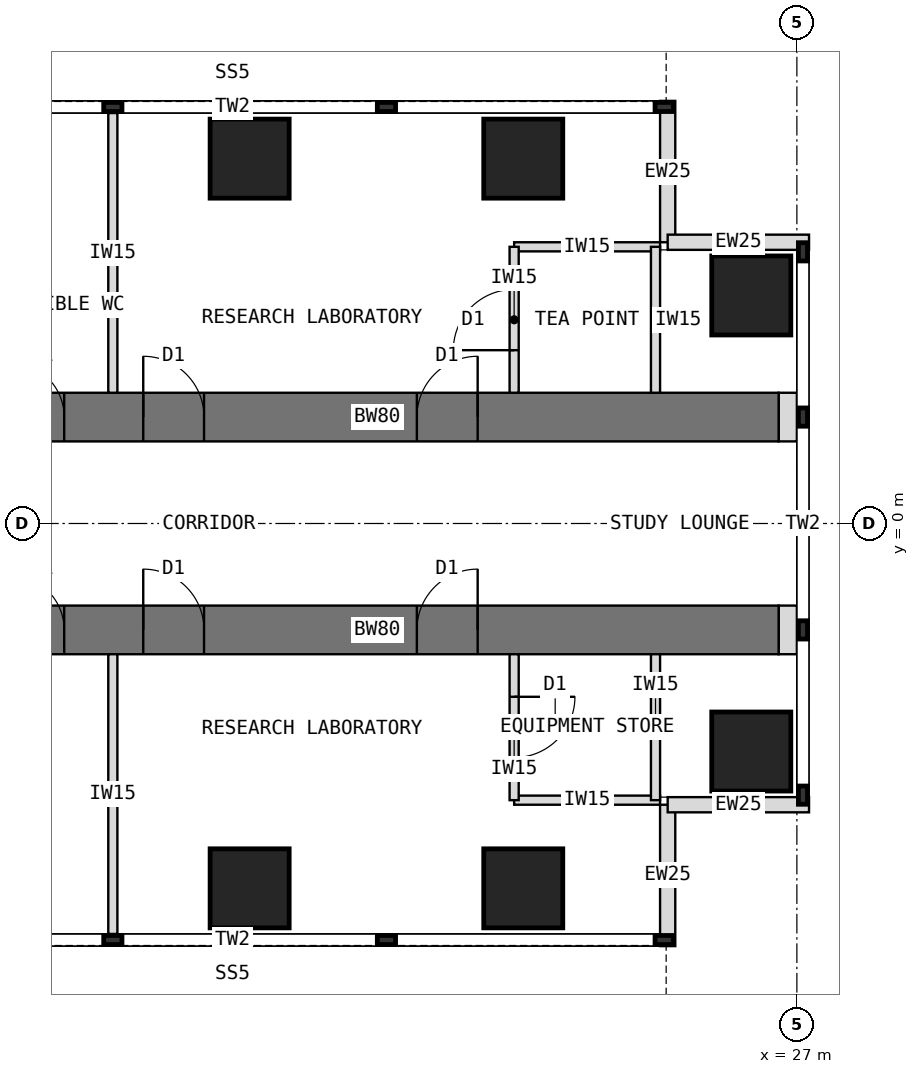
"""IFC4 building model, lengths in metres.
Left out: names, types, materials, properties, quantities, classifications, styles, units other than length and angle.
Written with IfcOpenShell. Run it as: python <this file> out.ifc"""

import sys

from ifc_helpers import new_model, si_unit, direction, frame, frame_2d, origin, origin_2d, place, context, subcontext, project, spatial, rectangle, extrude, element, fill, save


model = new_model("IFC4")
c1 = context("Model", 3, precision=1e-05, world=origin(), true_north=direction((0.0, 1.0)))
c2 = subcontext(c1, "Body", "Model", "MODEL_VIEW")
j1 = project(units=[si_unit("LENGTHUNIT", "METRE"), si_unit("PLANEANGLEUNIT", "RADIAN")], contexts=[c1])
p1 = place(None, origin())
s1 = spatial("IfcSite", under=j1, at=p1, CompositionType="ELEMENT")
p2 = place(p1, origin())
s2 = spatial("IfcBuilding", under=s1, at=p2, CompositionType="ELEMENT")
p3 = place(p2, frame((0.0, 0.0, 121.5)))
s3 = spatial("IfcBuildingStorey", under=s2, at=p3, CompositionType="ELEMENT", Elevation=121.5)
p4 = place(p3, frame((13.5, 1.75, 0.0), z_axis=(0.0, 0.0, 1.0), x_axis=(1.0, 0.0, 0.0)))
e1 = element("IfcWall", 1, at=p4, inside=s3, PredefinedType="SHEAR", context=c2, shape_type="SweptSolid", body=[
    extrude(rectangle(XDim=13.2, YDim=0.8, at=frame_2d((6.6, 0.0))), origin(), (0.0, 0.0, 1.0), 4.0),
])
p5 = place(p4, frame((0.55, 0.0, 0.0)))
e2 = element("IfcOpeningElement", 2, at=p5, cuts=e1, PredefinedType="OPENING", context=c2, shape_type="SweptSolid", body=[
    extrude(rectangle(XDim=0.9, YDim=2.1, at=frame_2d((0.45, 1.05))), frame((0.0, 0.41, 0.0), z_axis=(0.0, -1.0, 0.0), x_axis=(1.0, 0.0, 0.0)), (0.0, 0.0, 1.0), 0.82),
])
p6 = place(p4, frame((2.75, 0.0, 0.0)))
e3 = element("IfcOpeningElement", 3, at=p6, cuts=e1, PredefinedType="OPENING", context=c2, shape_type="SweptSolid", body=[
    extrude(rectangle(XDim=1.0, YDim=2.1, at=frame_2d((0.5, 1.05))), frame((0.0, 0.41, 0.0), z_axis=(0.0, -1.0, 0.0), x_axis=(1.0, 0.0, 0.0)), (0.0, 0.0, 1.0), 0.82),
])
p7 = place(p4, frame((7.25, 0.0, 0.0)))
e4 = element("IfcOpeningElement", 4, at=p7, cuts=e1, PredefinedType="OPENING", context=c2, shape_type="SweptSolid", body=[
    extrude(rectangle(XDim=1.0, YDim=2.1, at=frame_2d((0.5, 1.05))), frame((0.0, 0.41, 0.0), z_axis=(0.0, -1.0, 0.0), x_axis=(1.0, 0.0, 0.0)), (0.0, 0.0, 1.0), 0.82),
])
p8 = place(p3, frame((13.5, -1.75, 0.0), z_axis=(0.0, 0.0, 1.0), x_axis=(1.0, 0.0, 0.0)))
e5 = element("IfcWall", 5, at=p8, inside=s3, PredefinedType="SHEAR", context=c2, shape_type="SweptSolid", body=[
    extrude(rectangle(XDim=13.2, YDim=0.8, at=frame_2d((6.6, 0.0))), origin(), (0.0, 0.0, 1.0), 4.0),
])
p9 = place(p8, frame((0.55, 0.0, 0.0)))
e6 = element("IfcOpeningElement", 6, at=p9, cuts=e5, PredefinedType="OPENING", context=c2, shape_type="SweptSolid", body=[
    extrude(rectangle(XDim=0.9, YDim=2.1, at=frame_2d((0.45, 1.05))), frame((0.0, 0.41, 0.0), z_axis=(0.0, -1.0, 0.0), x_axis=(1.0, 0.0, 0.0)), (0.0, 0.0, 1.0), 0.82),
])
p10 = place(p8, frame((2.75, 0.0, 0.0)))
e7 = element("IfcOpeningElement", 7, at=p10, cuts=e5, PredefinedType="OPENING", context=c2, shape_type="SweptSolid", body=[
    extrude(rectangle(XDim=1.0, YDim=2.1, at=frame_2d((0.5, 1.05))), frame((0.0, 0.41, 0.0), z_axis=(0.0, -1.0, 0.0), x_axis=(1.0, 0.0, 0.0)), (0.0, 0.0, 1.0), 0.82),
])
p11 = place(p8, frame((7.25, 0.0, 0.0)))
e8 = element("IfcOpeningElement", 8, at=p11, cuts=e5, PredefinedType="OPENING", context=c2, shape_type="SweptSolid", body=[
    extrude(rectangle(XDim=1.0, YDim=2.1, at=frame_2d((0.5, 1.05))), frame((0.0, 0.41, 0.0), z_axis=(0.0, -1.0, 0.0), x_axis=(1.0, 0.0, 0.0)), (0.0, 0.0, 1.0), 0.82),
])
for number, where, z_axis, x_axis in (
    (9, (18.0, 6.0, 0.0), (0.0, 0.0, 1.0), (1.0, 0.0, 0.0)),
    (10, (18.0, -6.0, 0.0), (0.0, 0.0, 1.0), (1.0, 0.0, 0.0)),
    (11, (22.5, 6.0, 0.0), (0.0, 0.0, 1.0), (1.0, 0.0, 0.0)),
    (12, (22.5, -6.0, 0.0), (0.0, 0.0, 1.0), (1.0, 0.0, 0.0)),
    (13, (26.25, 3.75, 0.0), (0.0, 0.0, 1.0), (1.0, 0.0, 0.0)),
    (14, (26.25, -3.75, 0.0), (0.0, 0.0, 1.0), (1.0, 0.0, 0.0)),
):
    element("IfcColumn", number, at=place(p3, frame(where, z_axis=z_axis, x_axis=x_axis)), inside=s3, PredefinedType="COLUMN", context=c2, shape_type="SweptSolid", body=[
        extrude(rectangle(XDim=1.3, YDim=1.3, at=origin_2d()), origin(), (0.0, 0.0, 1.0), 4.0),
    ])
for number, where, z_axis, x_axis in (
    (15, (24.875, 6.95, 0.0), (0.0, 0.0, 1.0), (0.0, -1.0, 0.0)),
    (16, (24.875, 4.625, 0.0), (0.0, 0.0, 1.0), (1.0, 0.0, 0.0)),
    (17, (24.875, -6.95, 0.0), (0.0, 0.0, 1.0), (0.0, 1.0, 0.0)),
    (18, (24.875, -4.625, 0.0), (0.0, 0.0, 1.0), (1.0, 0.0, 0.0)),
):
    element("IfcWall", number, at=place(p3, frame(where, z_axis=z_axis, x_axis=x_axis)), inside=s3, PredefinedType="STANDARD", context=c2, shape_type="SweptSolid", body=[
        extrude(rectangle(XDim=2.325, YDim=0.25, at=frame_2d((1.163, 0.0))), origin(), (0.0, 0.0, 1.0), 3.8),
    ])
for number, where, z_axis, x_axis in (
    (19, (26.7, 1.75, 0.0), (0.0, 0.0, 1.0), (1.0, 0.0, 0.0)),
    (20, (26.7, -1.75, 0.0), (0.0, 0.0, 1.0), (1.0, 0.0, 0.0)),
):
    element("IfcWall", number, at=place(p3, frame(where, z_axis=z_axis, x_axis=x_axis)), inside=s3, PredefinedType="PARTITIONING", context=c2, shape_type="SweptSolid", body=[
        extrude(rectangle(XDim=0.3, YDim=0.8, at=frame_2d((0.15, 0.0))), origin(), (0.0, 0.0, 1.0), 3.8),
    ])
p12 = place(p3, frame((15.75, 2.15, 0.0), z_axis=(0.0, 0.0, 1.0), x_axis=(0.0, 1.0, 0.0)))
e21 = element("IfcWall", 21, at=p12, inside=s3, PredefinedType="PARTITIONING", context=c2, shape_type="SweptSolid", body=[
    extrude(rectangle(XDim=4.6, YDim=0.15, at=frame_2d((2.3, 0.0))), origin(), (0.0, 0.0, 1.0), 3.8),
])
p13 = place(p3, frame((22.35, 4.55, 0.0), z_axis=(0.0, 0.0, 1.0), x_axis=(1.0, 0.0, 0.0)))
e22 = element("IfcWall", 22, at=p13, inside=s3, PredefinedType="PARTITIONING", context=c2, shape_type="SweptSolid", body=[
    extrude(rectangle(XDim=2.4, YDim=0.15, at=frame_2d((1.2, 0.0))), origin(), (0.0, 0.0, 1.0), 3.8),
])
p14 = place(p3, frame((22.35, 2.15, 0.0), z_axis=(0.0, 0.0, 1.0), x_axis=(0.0, 1.0, 0.0)))
e23 = element("IfcWall", 23, at=p14, inside=s3, PredefinedType="PARTITIONING", context=c2, shape_type="SweptSolid", body=[
    extrude(rectangle(XDim=2.4, YDim=0.15, at=frame_2d((1.2, 0.0))), origin(), (0.0, 0.0, 1.0), 3.8),
])
p15 = place(p14, frame((0.7, 0.0, 0.0)))
e24 = element("IfcOpeningElement", 24, at=p15, cuts=e23, PredefinedType="OPENING", context=c2, shape_type="SweptSolid", body=[
    extrude(rectangle(XDim=1.0, YDim=2.1, at=frame_2d((0.5, 1.05))), frame((0.0, 0.085, 0.0), z_axis=(0.0, -1.0, 0.0), x_axis=(1.0, 0.0, 0.0)), (0.0, 0.0, 1.0), 0.17),
])
p16 = place(p3, frame((24.675, 2.15, 0.0), z_axis=(0.0, 0.0, 1.0), x_axis=(0.0, 1.0, 0.0)))
e25 = element("IfcWall", 25, at=p16, inside=s3, PredefinedType="PARTITIONING", context=c2, shape_type="SweptSolid", body=[
    extrude(rectangle(XDim=2.4, YDim=0.15, at=frame_2d((1.2, 0.0))), origin(), (0.0, 0.0, 1.0), 3.8),
])
p17 = place(p3, frame((15.75, -2.15, 0.0), z_axis=(0.0, 0.0, 1.0), x_axis=(0.0, -1.0, 0.0)))
e26 = element("IfcWall", 26, at=p17, inside=s3, PredefinedType="PARTITIONING", context=c2, shape_type="SweptSolid", body=[
    extrude(rectangle(XDim=4.6, YDim=0.15, at=frame_2d((2.3, 0.0))), origin(), (0.0, 0.0, 1.0), 3.8),
])
p18 = place(p3, frame((22.35, -4.55, 0.0), z_axis=(0.0, 0.0, 1.0), x_axis=(1.0, 0.0, 0.0)))
e27 = element("IfcWall", 27, at=p18, inside=s3, PredefinedType="PARTITIONING", context=c2, shape_type="SweptSolid", body=[
    extrude(rectangle(XDim=2.4, YDim=0.15, at=frame_2d((1.2, 0.0))), origin(), (0.0, 0.0, 1.0), 3.8),
])
p19 = place(p3, frame((22.35, -2.15, 0.0), z_axis=(0.0, 0.0, 1.0), x_axis=(0.0, -1.0, 0.0)))
e28 = element("IfcWall", 28, at=p19, inside=s3, PredefinedType="PARTITIONING", context=c2, shape_type="SweptSolid", body=[
    extrude(rectangle(XDim=2.4, YDim=0.15, at=frame_2d((1.2, 0.0))), origin(), (0.0, 0.0, 1.0), 3.8),
])
p20 = place(p19, frame((0.7, 0.0, 0.0)))
e29 = element("IfcOpeningElement", 29, at=p20, cuts=e28, PredefinedType="OPENING", context=c2, shape_type="SweptSolid", body=[
    extrude(rectangle(XDim=1.0, YDim=2.1, at=frame_2d((0.5, 1.05))), frame((0.0, 0.085, 0.0), z_axis=(0.0, -1.0, 0.0), x_axis=(1.0, 0.0, 0.0)), (0.0, 0.0, 1.0), 0.17),
])
p21 = place(p3, frame((24.675, -2.15, 0.0), z_axis=(0.0, 0.0, 1.0), x_axis=(0.0, -1.0, 0.0)))
e30 = element("IfcWall", 30, at=p21, inside=s3, PredefinedType="PARTITIONING", context=c2, shape_type="SweptSolid", body=[
    extrude(rectangle(XDim=2.4, YDim=0.15, at=frame_2d((1.2, 0.0))), origin(), (0.0, 0.0, 1.0), 3.8),
])
p22 = place(p15, origin())
e31 = element("IfcDoor", 31, at=p22, inside=s3, OperationType="SINGLE_SWING_LEFT", PredefinedType="DOOR", context=c2, shape_type="SweptSolid", body=[
    extrude(rectangle(XDim=1.0, YDim=2.1, at=frame_2d((0.5, 1.05))), frame((0.0, 0.025, 0.0), z_axis=(0.0, -1.0, 0.0), x_axis=(1.0, 0.0, 0.0)), (0.0, 0.0, 1.0), 0.05),
])
fill(e24, e31)
p23 = place(p20, origin())
e32 = element("IfcDoor", 32, at=p23, inside=s3, OperationType="SINGLE_SWING_LEFT", PredefinedType="DOOR", context=c2, shape_type="SweptSolid", body=[
    extrude(rectangle(XDim=1.0, YDim=2.1, at=frame_2d((0.5, 1.05))), frame((0.0, 0.025, 0.0), z_axis=(0.0, -1.0, 0.0), x_axis=(1.0, 0.0, 0.0)), (0.0, 0.0, 1.0), 0.05),
])
fill(e29, e32)
p24 = place(p5, origin())
e33 = element("IfcDoor", 33, at=p24, inside=s3, OperationType="SINGLE_SWING_LEFT", PredefinedType="DOOR", context=c2, shape_type="SweptSolid", body=[
    extrude(rectangle(XDim=0.82, YDim=2.06, at=frame_2d((0.45, 1.03))), frame((0.0, 0.025, 0.0), z_axis=(0.0, -1.0, 0.0), x_axis=(1.0, 0.0, 0.0)), (0.0, 0.0, 1.0), 0.05),
    extrude(rectangle(XDim=0.04, YDim=2.1, at=frame_2d((0.02, 1.05))), frame((0.0, 0.4, 0.0), z_axis=(0.0, -1.0, 0.0), x_axis=(1.0, 0.0, 0.0)), (0.0, 0.0, 1.0), 0.8),
    extrude(rectangle(XDim=0.04, YDim=2.1, at=frame_2d((0.88, 1.05))), frame((0.0, 0.4, 0.0), z_axis=(0.0, -1.0, 0.0), x_axis=(1.0, 0.0, 0.0)), (0.0, 0.0, 1.0), 0.8),
    extrude(rectangle(XDim=0.82, YDim=0.04, at=frame_2d((0.45, 2.08))), frame((0.0, 0.4, 0.0), z_axis=(0.0, -1.0, 0.0), x_axis=(1.0, 0.0, 0.0)), (0.0, 0.0, 1.0), 0.8),
])
fill(e2, e33)
p25 = place(p6, origin())
e34 = element("IfcDoor", 34, at=p25, inside=s3, OperationType="SINGLE_SWING_LEFT", PredefinedType="DOOR", context=c2, shape_type="SweptSolid", body=[
    extrude(rectangle(XDim=0.92, YDim=2.06, at=frame_2d((0.5, 1.03))), frame((0.0, 0.025, 0.0), z_axis=(0.0, -1.0, 0.0), x_axis=(1.0, 0.0, 0.0)), (0.0, 0.0, 1.0), 0.05),
    extrude(rectangle(XDim=0.04, YDim=2.1, at=frame_2d((0.02, 1.05))), frame((0.0, 0.4, 0.0), z_axis=(0.0, -1.0, 0.0), x_axis=(1.0, 0.0, 0.0)), (0.0, 0.0, 1.0), 0.8),
    extrude(rectangle(XDim=0.04, YDim=2.1, at=frame_2d((0.98, 1.05))), frame((0.0, 0.4, 0.0), z_axis=(0.0, -1.0, 0.0), x_axis=(1.0, 0.0, 0.0)), (0.0, 0.0, 1.0), 0.8),
    extrude(rectangle(XDim=0.92, YDim=0.04, at=frame_2d((0.5, 2.08))), frame((0.0, 0.4, 0.0), z_axis=(0.0, -1.0, 0.0), x_axis=(1.0, 0.0, 0.0)), (0.0, 0.0, 1.0), 0.8),
])
fill(e3, e34)
p26 = place(p7, origin())
e35 = element("IfcDoor", 35, at=p26, inside=s3, OperationType="SINGLE_SWING_RIGHT", PredefinedType="DOOR", context=c2, shape_type="SweptSolid", body=[
    extrude(rectangle(XDim=0.92, YDim=2.06, at=frame_2d((0.5, 1.03))), frame((0.0, 0.025, 0.0), z_axis=(0.0, -1.0, 0.0), x_axis=(1.0, 0.0, 0.0)), (0.0, 0.0, 1.0), 0.05),
    extrude(rectangle(XDim=0.04, YDim=2.1, at=frame_2d((0.02, 1.05))), frame((0.0, 0.4, 0.0), z_axis=(0.0, -1.0, 0.0), x_axis=(1.0, 0.0, 0.0)), (0.0, 0.0, 1.0), 0.8),
    extrude(rectangle(XDim=0.04, YDim=2.1, at=frame_2d((0.98, 1.05))), frame((0.0, 0.4, 0.0), z_axis=(0.0, -1.0, 0.0), x_axis=(1.0, 0.0, 0.0)), (0.0, 0.0, 1.0), 0.8),
    extrude(rectangle(XDim=0.92, YDim=0.04, at=frame_2d((0.5, 2.08))), frame((0.0, 0.4, 0.0), z_axis=(0.0, -1.0, 0.0), x_axis=(1.0, 0.0, 0.0)), (0.0, 0.0, 1.0), 0.8),
])
fill(e4, e35)
p27 = place(p9, origin())
e36 = element("IfcDoor", 36, at=p27, inside=s3, OperationType="SINGLE_SWING_LEFT", PredefinedType="DOOR", context=c2, shape_type="SweptSolid", body=[
    extrude(rectangle(XDim=0.82, YDim=2.06, at=frame_2d((0.45, 1.03))), frame((0.0, 0.025, 0.0), z_axis=(0.0, -1.0, 0.0), x_axis=(1.0, 0.0, 0.0)), (0.0, 0.0, 1.0), 0.05),
    extrude(rectangle(XDim=0.04, YDim=2.1, at=frame_2d((0.02, 1.05))), frame((0.0, 0.4, 0.0), z_axis=(0.0, -1.0, 0.0), x_axis=(1.0, 0.0, 0.0)), (0.0, 0.0, 1.0), 0.8),
    extrude(rectangle(XDim=0.04, YDim=2.1, at=frame_2d((0.88, 1.05))), frame((0.0, 0.4, 0.0), z_axis=(0.0, -1.0, 0.0), x_axis=(1.0, 0.0, 0.0)), (0.0, 0.0, 1.0), 0.8),
    extrude(rectangle(XDim=0.82, YDim=0.04, at=frame_2d((0.45, 2.08))), frame((0.0, 0.4, 0.0), z_axis=(0.0, -1.0, 0.0), x_axis=(1.0, 0.0, 0.0)), (0.0, 0.0, 1.0), 0.8),
])
fill(e6, e36)
p28 = place(p10, origin())
e37 = element("IfcDoor", 37, at=p28, inside=s3, OperationType="SINGLE_SWING_LEFT", PredefinedType="DOOR", context=c2, shape_type="SweptSolid", body=[
    extrude(rectangle(XDim=0.92, YDim=2.06, at=frame_2d((0.5, 1.03))), frame((0.0, 0.025, 0.0), z_axis=(0.0, -1.0, 0.0), x_axis=(1.0, 0.0, 0.0)), (0.0, 0.0, 1.0), 0.05),
    extrude(rectangle(XDim=0.04, YDim=2.1, at=frame_2d((0.02, 1.05))), frame((0.0, 0.4, 0.0), z_axis=(0.0, -1.0, 0.0), x_axis=(1.0, 0.0, 0.0)), (0.0, 0.0, 1.0), 0.8),
    extrude(rectangle(XDim=0.04, YDim=2.1, at=frame_2d((0.98, 1.05))), frame((0.0, 0.4, 0.0), z_axis=(0.0, -1.0, 0.0), x_axis=(1.0, 0.0, 0.0)), (0.0, 0.0, 1.0), 0.8),
    extrude(rectangle(XDim=0.92, YDim=0.04, at=frame_2d((0.5, 2.08))), frame((0.0, 0.4, 0.0), z_axis=(0.0, -1.0, 0.0), x_axis=(1.0, 0.0, 0.0)), (0.0, 0.0, 1.0), 0.8),
])
fill(e7, e37)
p29 = place(p11, origin())
e38 = element("IfcDoor", 38, at=p29, inside=s3, OperationType="SINGLE_SWING_RIGHT", PredefinedType="DOOR", context=c2, shape_type="SweptSolid", body=[
    extrude(rectangle(XDim=0.92, YDim=2.06, at=frame_2d((0.5, 1.03))), frame((0.0, 0.025, 0.0), z_axis=(0.0, -1.0, 0.0), x_axis=(1.0, 0.0, 0.0)), (0.0, 0.0, 1.0), 0.05),
    extrude(rectangle(XDim=0.04, YDim=2.1, at=frame_2d((0.02, 1.05))), frame((0.0, 0.4, 0.0), z_axis=(0.0, -1.0, 0.0), x_axis=(1.0, 0.0, 0.0)), (0.0, 0.0, 1.0), 0.8),
    extrude(rectangle(XDim=0.04, YDim=2.1, at=frame_2d((0.98, 1.05))), frame((0.0, 0.4, 0.0), z_axis=(0.0, -1.0, 0.0), x_axis=(1.0, 0.0, 0.0)), (0.0, 0.0, 1.0), 0.8),
    extrude(rectangle(XDim=0.92, YDim=0.04, at=frame_2d((0.5, 2.08))), frame((0.0, 0.4, 0.0), z_axis=(0.0, -1.0, 0.0), x_axis=(1.0, 0.0, 0.0)), (0.0, 0.0, 1.0), 0.8),
])
fill(e8, e38)
save(model, sys.argv[1])
